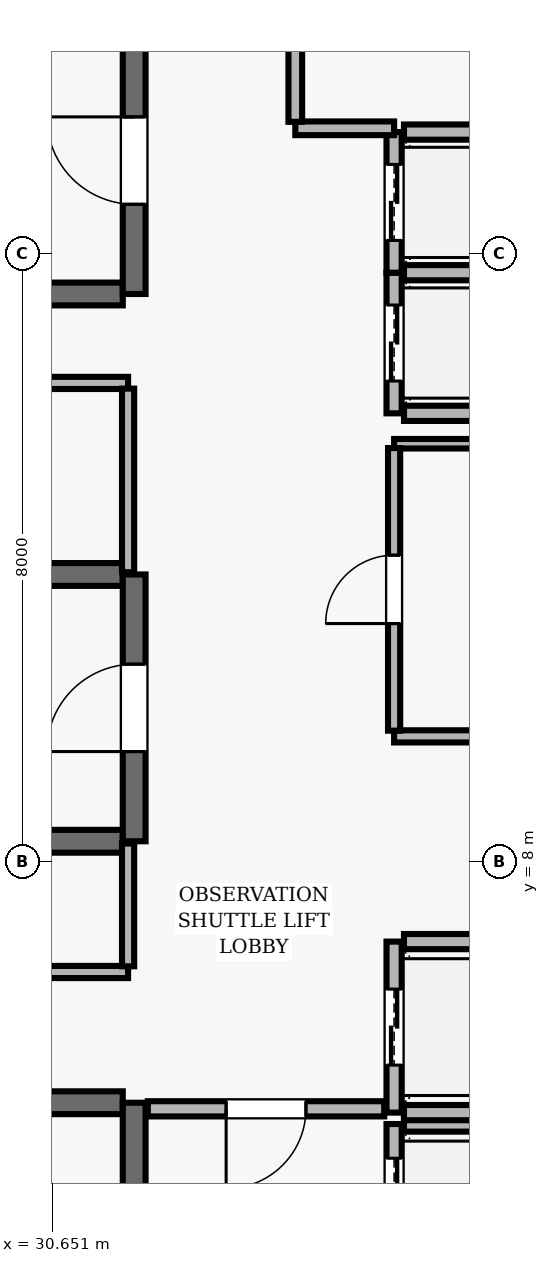
"""IFC4 building model, lengths in metres.
Left out: names, types, materials, properties, quantities, classifications, styles, units other than length and angle.
Written with IfcOpenShell. Run it as: python <this file> out.ifc"""

import sys

from ifc_helpers import new_model, si_unit, direction, frame, frame_2d, origin, place, context, subcontext, project, spatial, rectangle, extrude, element, fill, save


model = new_model("IFC4")
c1 = context("Model", 3, precision=1e-05, world=origin(), true_north=direction((0.0, 1.0)))
c2 = subcontext(c1, "Body", "Model", "MODEL_VIEW")
j1 = project(units=[si_unit("LENGTHUNIT", "METRE"), si_unit("PLANEANGLEUNIT", "RADIAN")], contexts=[c1])
p1 = place(None, origin())
s1 = spatial("IfcSite", under=j1, at=p1, CompositionType="ELEMENT")
p2 = place(p1, origin())
s2 = spatial("IfcBuilding", under=s1, at=p2, CompositionType="ELEMENT")
p3 = place(p2, frame((0.0, 0.0, 311.7)))
s3 = spatial("IfcBuildingStorey", under=s2, at=p3, CompositionType="ELEMENT", Elevation=311.7)
p4 = place(p3, frame((31.58, 4.83, 0.0), z_axis=(0.0, 0.0, 1.0), x_axis=(-1.0, 0.0, 0.0)))
e1 = element("IfcWall", 1, at=p4, inside=s3, PredefinedType="SHEAR", context=c2, shape_type="SweptSolid", body=[
    extrude(rectangle(XDim=8.36, YDim=0.3, at=frame_2d((4.18, 0.0))), origin(), (0.0, 0.0, 1.0), 4.74),
])
p5 = place(p3, frame((31.73, 0.96, 0.0), z_axis=(0.0, 0.0, 1.0), x_axis=(0.0, 1.0, 0.0)))
e2 = element("IfcWall", 2, at=p5, inside=s3, PredefinedType="SHEAR", context=c2, shape_type="SweptSolid", body=[
    extrude(rectangle(XDim=3.87, YDim=0.3, at=frame_2d((1.935, 0.0))), origin(), (0.0, 0.0, 1.0), 4.74),
])
p6 = place(p5, frame((1.54, 0.0, 0.0)))
e3 = element("IfcOpeningElement", 3, at=p6, cuts=e2, PredefinedType="OPENING", context=c2, shape_type="SweptSolid", body=[
    extrude(rectangle(XDim=1.15, YDim=2.15, at=frame_2d((0.575, 1.075))), frame((0.0, 0.16, 0.0), z_axis=(0.0, -1.0, 0.0), x_axis=(1.0, 0.0, 0.0)), (0.0, 0.0, 1.0), 0.32),
])
p7 = place(p3, frame((23.22, 15.47, 0.0), z_axis=(0.0, 0.0, 1.0), x_axis=(1.0, 0.0, 0.0)))
e4 = element("IfcWall", 4, at=p7, inside=s3, PredefinedType="SHEAR", context=c2, shape_type="SweptSolid", body=[
    extrude(rectangle(XDim=8.36, YDim=0.3, at=frame_2d((4.18, 0.0))), origin(), (0.0, 0.0, 1.0), 4.74),
])
p8 = place(p3, frame((31.73, 15.47, 0.0), z_axis=(0.0, 0.0, 1.0), x_axis=(0.0, 1.0, 0.0)))
e5 = element("IfcWall", 5, at=p8, inside=s3, PredefinedType="SHEAR", context=c2, shape_type="SweptSolid", body=[
    extrude(rectangle(XDim=3.51, YDim=0.3, at=frame_2d((1.755, 0.0))), origin(), (0.0, 0.0, 1.0), 4.74),
])
p9 = place(p8, frame((1.18, 0.0, 0.0)))
e6 = element("IfcOpeningElement", 6, at=p9, cuts=e5, PredefinedType="OPENING", context=c2, shape_type="SweptSolid", body=[
    extrude(rectangle(XDim=1.15, YDim=2.15, at=frame_2d((0.575, 1.075))), frame((0.0, 0.16, 0.0), z_axis=(0.0, -1.0, 0.0), x_axis=(1.0, 0.0, 0.0)), (0.0, 0.0, 1.0), 0.32),
])
for number, where, z_axis, x_axis in (
    (7, (31.58, 11.78, 0.0), (0.0, 0.0, 1.0), (-1.0, 0.0, 0.0)),
    (8, (23.22, 8.27, 0.0), (0.0, 0.0, 1.0), (1.0, 0.0, 0.0)),
):
    element("IfcWall", number, at=place(p3, frame(where, z_axis=z_axis, x_axis=x_axis)), inside=s3, PredefinedType="SHEAR", context=c2, shape_type="SweptSolid", body=[
        extrude(rectangle(XDim=8.36, YDim=0.3, at=frame_2d((4.18, 0.0))), origin(), (0.0, 0.0, 1.0), 4.74),
    ])
p10 = place(p3, frame((31.73, 8.27, 0.0), z_axis=(0.0, 0.0, 1.0), x_axis=(0.0, 1.0, 0.0)))
e9 = element("IfcWall", 9, at=p10, inside=s3, PredefinedType="SHEAR", context=c2, shape_type="SweptSolid", body=[
    extrude(rectangle(XDim=3.51, YDim=0.3, at=frame_2d((1.755, 0.0))), origin(), (0.0, 0.0, 1.0), 4.74),
])
p11 = place(p10, frame((1.18, 0.0, 0.0)))
e10 = element("IfcOpeningElement", 10, at=p11, cuts=e9, PredefinedType="OPENING", context=c2, shape_type="SweptSolid", body=[
    extrude(rectangle(XDim=1.15, YDim=2.15, at=frame_2d((0.575, 1.075))), frame((0.0, 0.16, 0.0), z_axis=(0.0, -1.0, 0.0), x_axis=(1.0, 0.0, 0.0)), (0.0, 0.0, 1.0), 0.32),
])
p12 = place(p3, frame((35.15, 4.55, 0.0), z_axis=(0.0, 0.0, 1.0), x_axis=(0.0, -1.0, 0.0)))
e11 = element("IfcWall", 11, at=p12, inside=s3, PredefinedType="SOLIDWALL", context=c2, shape_type="SweptSolid", body=[
    extrude(rectangle(XDim=2.1, YDim=0.2, at=frame_2d((1.05, 0.0))), origin(), (0.0, 0.0, 1.0), 4.74),
])
p13 = place(p12, frame((0.45, 0.0, 0.0)))
e12 = element("IfcOpeningElement", 12, at=p13, cuts=e11, PredefinedType="OPENING", context=c2, shape_type="SweptSolid", body=[
    extrude(rectangle(XDim=1.2, YDim=2.15, at=frame_2d((0.6, 1.075))), frame((0.0, 0.11, 0.0), z_axis=(0.0, -1.0, 0.0), x_axis=(1.0, 0.0, 0.0)), (0.0, 0.0, 1.0), 0.22),
])
p14 = place(p3, frame((37.42, 4.55, 0.0), z_axis=(0.0, 0.0, 1.0), x_axis=(-1.0, 0.0, 0.0)))
e13 = element("IfcWall", 13, at=p14, inside=s3, PredefinedType="SOLIDWALL", context=c2, shape_type="SweptSolid", body=[
    extrude(rectangle(XDim=2.14, YDim=0.2, at=frame_2d((1.07, 0.0))), origin(), (0.0, 0.0, 1.0), 4.74),
])
p15 = place(p3, frame((35.15, 6.95, 0.0), z_axis=(0.0, 0.0, 1.0), x_axis=(0.0, -1.0, 0.0)))
e14 = element("IfcWall", 14, at=p15, inside=s3, PredefinedType="SOLIDWALL", context=c2, shape_type="SweptSolid", body=[
    extrude(rectangle(XDim=2.25, YDim=0.2, at=frame_2d((1.125, 0.0))), origin(), (0.0, 0.0, 1.0), 4.74),
])
p16 = place(p15, frame((0.625, 0.0, 0.0)))
e15 = element("IfcOpeningElement", 15, at=p16, cuts=e14, PredefinedType="OPENING", context=c2, shape_type="SweptSolid", body=[
    extrude(rectangle(XDim=1.0, YDim=2.1, at=frame_2d((0.5, 1.05))), frame((0.0, 0.11, 0.0), z_axis=(0.0, -1.0, 0.0), x_axis=(1.0, 0.0, 0.0)), (0.0, 0.0, 1.0), 0.22),
])
for number, where, z_axis, x_axis in (
    (16, (35.28, 4.7, 0.0), (0.0, 0.0, 1.0), (1.0, 0.0, 0.0)),
    (17, (37.42, 6.95, 0.0), (0.0, 0.0, 1.0), (-1.0, 0.0, 0.0)),
):
    element("IfcWall", number, at=place(p3, frame(where, z_axis=z_axis, x_axis=x_axis)), inside=s3, PredefinedType="SOLIDWALL", context=c2, shape_type="SweptSolid", body=[
        extrude(rectangle(XDim=2.14, YDim=0.2, at=frame_2d((1.07, 0.0))), origin(), (0.0, 0.0, 1.0), 4.74),
    ])
p17 = place(p3, frame((35.15, 15.75, 0.0), z_axis=(0.0, 0.0, 1.0), x_axis=(0.0, -1.0, 0.0)))
e18 = element("IfcWall", 18, at=p17, inside=s3, PredefinedType="SOLIDWALL", context=c2, shape_type="SweptSolid", body=[
    extrude(rectangle(XDim=1.85, YDim=0.2, at=frame_2d((0.925, 0.0))), origin(), (0.0, 0.0, 1.0), 4.74),
])
p18 = place(p17, frame((0.425, 0.0, 0.0)))
e19 = element("IfcOpeningElement", 19, at=p18, cuts=e18, PredefinedType="OPENING", context=c2, shape_type="SweptSolid", body=[
    extrude(rectangle(XDim=1.0, YDim=2.1, at=frame_2d((0.5, 1.05))), frame((0.0, 0.11, 0.0), z_axis=(0.0, -1.0, 0.0), x_axis=(1.0, 0.0, 0.0)), (0.0, 0.0, 1.0), 0.22),
])
for number, where, z_axis, x_axis in (
    (20, (35.28, 13.9, 0.0), (0.0, 0.0, 1.0), (1.0, 0.0, 0.0)),
    (21, (37.42, 15.75, 0.0), (0.0, 0.0, 1.0), (-1.0, 0.0, 0.0)),
):
    element("IfcWall", number, at=place(p3, frame(where, z_axis=z_axis, x_axis=x_axis)), inside=s3, PredefinedType="SOLIDWALL", context=c2, shape_type="SweptSolid", body=[
        extrude(rectangle(XDim=2.14, YDim=0.2, at=frame_2d((1.07, 0.0))), origin(), (0.0, 0.0, 1.0), 4.74),
    ])
p19 = place(p3, frame((35.15, 17.6, 0.0), z_axis=(0.0, 0.0, 1.0), x_axis=(0.0, -1.0, 0.0)))
e22 = element("IfcWall", 22, at=p19, inside=s3, PredefinedType="SOLIDWALL", context=c2, shape_type="SweptSolid", body=[
    extrude(rectangle(XDim=1.85, YDim=0.2, at=frame_2d((0.925, 0.0))), origin(), (0.0, 0.0, 1.0), 4.74),
])
p20 = place(p19, frame((0.425, 0.0, 0.0)))
e23 = element("IfcOpeningElement", 23, at=p20, cuts=e22, PredefinedType="OPENING", context=c2, shape_type="SweptSolid", body=[
    extrude(rectangle(XDim=1.0, YDim=2.1, at=frame_2d((0.5, 1.05))), frame((0.0, 0.11, 0.0), z_axis=(0.0, -1.0, 0.0), x_axis=(1.0, 0.0, 0.0)), (0.0, 0.0, 1.0), 0.22),
])
p21 = place(p3, frame((37.42, 17.6, 0.0), z_axis=(0.0, 0.0, 1.0), x_axis=(-1.0, 0.0, 0.0)))
e24 = element("IfcWall", 24, at=p21, inside=s3, PredefinedType="SOLIDWALL", context=c2, shape_type="SweptSolid", body=[
    extrude(rectangle(XDim=2.14, YDim=0.2, at=frame_2d((1.07, 0.0))), origin(), (0.0, 0.0, 1.0), 4.74),
])
p22 = place(p3, frame((28.8, 14.3, 0.0), z_axis=(0.0, 0.0, 1.0), x_axis=(1.0, 0.0, 0.0)))
e25 = element("IfcWall", 25, at=p22, inside=s3, PredefinedType="PARTITIONING", context=c2, shape_type="SweptSolid", body=[
    extrude(rectangle(XDim=2.85, YDim=0.16, at=frame_2d((1.425, 0.0))), origin(), (0.0, 0.0, 1.0), 4.74),
])
p23 = place(p3, frame((31.65, 6.55, 0.0), z_axis=(0.0, 0.0, 1.0), x_axis=(-1.0, 0.0, 0.0)))
e26 = element("IfcWall", 26, at=p23, inside=s3, PredefinedType="PARTITIONING", context=c2, shape_type="SweptSolid", body=[
    extrude(rectangle(XDim=4.75, YDim=0.16, at=frame_2d((2.375, 0.0))), origin(), (0.0, 0.0, 1.0), 4.74),
])
p24 = place(p23, frame((1.935, 0.0, 0.0)))
e27 = element("IfcOpeningElement", 27, at=p24, cuts=e26, PredefinedType="OPENING", context=c2, shape_type="SweptSolid", body=[
    extrude(rectangle(XDim=0.88, YDim=2.1, at=frame_2d((0.44, 1.05))), frame((0.0, 0.09, 0.0), z_axis=(0.0, -1.0, 0.0), x_axis=(1.0, 0.0, 0.0)), (0.0, 0.0, 1.0), 0.18),
])
p25 = place(p3, frame((33.85, 17.65, 0.0), z_axis=(0.0, 0.0, 1.0), x_axis=(1.0, 0.0, 0.0)))
e28 = element("IfcWall", 28, at=p25, inside=s3, PredefinedType="PARTITIONING", context=c2, shape_type="SweptSolid", body=[
    extrude(rectangle(XDim=1.3, YDim=0.18, at=frame_2d((0.65, 0.0))), origin(), (0.0, 0.0, 1.0), 4.74),
])
p26 = place(p3, frame((35.02, 4.75, 0.0), z_axis=(0.0, 0.0, 1.0), x_axis=(-1.0, 0.0, 0.0)))
e29 = element("IfcWall", 29, at=p26, inside=s3, PredefinedType="SOLIDWALL", context=c2, shape_type="SweptSolid", body=[
    extrude(rectangle(XDim=3.11, YDim=0.2, at=frame_2d((1.555, 0.0))), origin(), (0.0, 0.0, 1.0), 4.74),
])
p27 = place(p26, frame((1.03, 0.0, 0.0)))
e30 = element("IfcOpeningElement", 30, at=p27, cuts=e29, PredefinedType="OPENING", context=c2, shape_type="SweptSolid", body=[
    extrude(rectangle(XDim=1.05, YDim=2.15, at=frame_2d((0.525, 1.075))), frame((0.0, 0.11, 0.0), z_axis=(0.0, -1.0, 0.0), x_axis=(1.0, 0.0, 0.0)), (0.0, 0.0, 1.0), 0.22),
])
p28 = place(p3, frame((35.15, 9.65, 0.0), z_axis=(0.0, 0.0, 1.0), x_axis=(1.0, 0.0, 0.0)))
e31 = element("IfcWall", 31, at=p28, inside=s3, PredefinedType="PARTITIONING", context=c2, shape_type="SweptSolid", body=[
    extrude(rectangle(XDim=2.7, YDim=0.16, at=frame_2d((1.35, 0.0))), origin(), (0.0, 0.0, 1.0), 4.74),
])
p29 = place(p3, frame((37.85, 13.5, 0.0), z_axis=(0.0, 0.0, 1.0), x_axis=(-1.0, 0.0, 0.0)))
e32 = element("IfcWall", 32, at=p29, inside=s3, PredefinedType="PARTITIONING", context=c2, shape_type="SweptSolid", body=[
    extrude(rectangle(XDim=2.7, YDim=0.125, at=frame_2d((1.35, 0.0))), origin(), (0.0, 0.0, 1.0), 4.74),
])
p30 = place(p3, frame((31.65, 8.24, 0.0), z_axis=(0.0, 0.0, 1.0), x_axis=(0.0, -1.0, 0.0)))
e33 = element("IfcWall", 33, at=p30, inside=s3, PredefinedType="PARTITIONING", context=c2, shape_type="SweptSolid", body=[
    extrude(rectangle(XDim=1.615, YDim=0.16, at=frame_2d((0.808, 0.0))), origin(), (0.0, 0.0, 1.0), 4.74),
])
p31 = place(p3, frame((31.65, 14.225, 0.0), z_axis=(0.0, 0.0, 1.0), x_axis=(0.0, -1.0, 0.0)))
e34 = element("IfcWall", 34, at=p31, inside=s3, PredefinedType="PARTITIONING", context=c2, shape_type="SweptSolid", body=[
    extrude(rectangle(XDim=2.415, YDim=0.16, at=frame_2d((1.208, 0.0))), origin(), (0.0, 0.0, 1.0), 4.74),
])
p32 = place(p3, frame((33.85, 17.735, 0.0), z_axis=(0.0, 0.0, 1.0), x_axis=(0.0, 1.0, 0.0)))
e35 = element("IfcWall", 35, at=p32, inside=s3, PredefinedType="PARTITIONING", context=c2, shape_type="SweptSolid", body=[
    extrude(rectangle(XDim=6.03, YDim=0.18, at=frame_2d((3.015, 0.0))), origin(), (0.0, 0.0, 1.0), 4.74),
])
p33 = place(p32, frame((2.54, 0.0, 0.0)))
e36 = element("IfcOpeningElement", 36, at=p33, cuts=e35, PredefinedType="OPENING", context=c2, shape_type="SweptSolid", body=[
    extrude(rectangle(XDim=0.95, YDim=2.1, at=frame_2d((0.475, 1.05))), frame((0.0, 0.1, 0.0), z_axis=(0.0, -1.0, 0.0), x_axis=(1.0, 0.0, 0.0)), (0.0, 0.0, 1.0), 0.2),
])
p34 = place(p3, frame((35.15, 9.725, 0.0), z_axis=(0.0, 0.0, 1.0), x_axis=(0.0, 1.0, 0.0)))
e37 = element("IfcWall", 37, at=p34, inside=s3, PredefinedType="PARTITIONING", context=c2, shape_type="SweptSolid", body=[
    extrude(rectangle(XDim=3.718, YDim=0.16, at=frame_2d((1.859, 0.0))), origin(), (0.0, 0.0, 1.0), 4.74),
])
p35 = place(p34, frame((1.409, 0.0, 0.0)))
e38 = element("IfcOpeningElement", 38, at=p35, cuts=e37, PredefinedType="OPENING", context=c2, shape_type="SweptSolid", body=[
    extrude(rectangle(XDim=0.9, YDim=2.1, at=frame_2d((0.45, 1.05))), frame((0.0, 0.09, 0.0), z_axis=(0.0, -1.0, 0.0), x_axis=(1.0, 0.0, 0.0)), (0.0, 0.0, 1.0), 0.18),
])
p36 = place(p9, origin())
e39 = element("IfcDoor", 39, at=p36, inside=s3, OperationType="SINGLE_SWING_RIGHT", PredefinedType="DOOR", context=c2, shape_type="SweptSolid", body=[
    extrude(rectangle(XDim=1.15, YDim=2.15, at=frame_2d((0.575, 1.075))), frame((0.0, 0.025, 0.0), z_axis=(0.0, -1.0, 0.0), x_axis=(1.0, 0.0, 0.0)), (0.0, 0.0, 1.0), 0.05),
])
fill(e6, e39)
p37 = place(p11, origin())
e40 = element("IfcDoor", 40, at=p37, inside=s3, OperationType="SINGLE_SWING_LEFT", PredefinedType="DOOR", context=c2, shape_type="SweptSolid", body=[
    extrude(rectangle(XDim=1.15, YDim=2.15, at=frame_2d((0.575, 1.075))), frame((0.0, 0.025, 0.0), z_axis=(0.0, -1.0, 0.0), x_axis=(1.0, 0.0, 0.0)), (0.0, 0.0, 1.0), 0.05),
])
fill(e10, e40)
p38 = place(p13, origin())
e41 = element("IfcDoor", 41, at=p38, inside=s3, OperationType="DOUBLE_DOOR_SLIDING", PredefinedType="DOOR", context=c2, shape_type="SweptSolid", body=[
    extrude(rectangle(XDim=1.2, YDim=2.15, at=frame_2d((0.6, 1.075))), frame((0.0, 0.025, 0.0), z_axis=(0.0, -1.0, 0.0), x_axis=(1.0, 0.0, 0.0)), (0.0, 0.0, 1.0), 0.05),
])
fill(e12, e41)
p39 = place(p16, origin())
e42 = element("IfcDoor", 42, at=p39, inside=s3, OperationType="DOUBLE_DOOR_SLIDING", PredefinedType="DOOR", context=c2, shape_type="SweptSolid", body=[
    extrude(rectangle(XDim=1.0, YDim=2.1, at=frame_2d((0.5, 1.05))), frame((0.0, 0.025, 0.0), z_axis=(0.0, -1.0, 0.0), x_axis=(1.0, 0.0, 0.0)), (0.0, 0.0, 1.0), 0.05),
])
fill(e15, e42)
p40 = place(p18, origin())
e43 = element("IfcDoor", 43, at=p40, inside=s3, OperationType="DOUBLE_DOOR_SLIDING", PredefinedType="DOOR", context=c2, shape_type="SweptSolid", body=[
    extrude(rectangle(XDim=1.0, YDim=2.1, at=frame_2d((0.5, 1.05))), frame((0.0, 0.025, 0.0), z_axis=(0.0, -1.0, 0.0), x_axis=(1.0, 0.0, 0.0)), (0.0, 0.0, 1.0), 0.05),
])
fill(e19, e43)
p41 = place(p20, origin())
e44 = element("IfcDoor", 44, at=p41, inside=s3, OperationType="DOUBLE_DOOR_SLIDING", PredefinedType="DOOR", context=c2, shape_type="SweptSolid", body=[
    extrude(rectangle(XDim=1.0, YDim=2.1, at=frame_2d((0.5, 1.05))), frame((0.0, 0.025, 0.0), z_axis=(0.0, -1.0, 0.0), x_axis=(1.0, 0.0, 0.0)), (0.0, 0.0, 1.0), 0.05),
])
fill(e23, e44)
p42 = place(p27, origin())
e45 = element("IfcDoor", 45, at=p42, inside=s3, OperationType="SINGLE_SWING_RIGHT", PredefinedType="DOOR", context=c2, shape_type="SweptSolid", body=[
    extrude(rectangle(XDim=1.05, YDim=2.15, at=frame_2d((0.525, 1.075))), frame((0.0, 0.025, 0.0), z_axis=(0.0, -1.0, 0.0), x_axis=(1.0, 0.0, 0.0)), (0.0, 0.0, 1.0), 0.05),
])
fill(e30, e45)
p43 = place(p35, origin())
e46 = element("IfcDoor", 46, at=p43, inside=s3, OperationType="SINGLE_SWING_LEFT", PredefinedType="DOOR", context=c2, shape_type="SweptSolid", body=[
    extrude(rectangle(XDim=0.9, YDim=2.1, at=frame_2d((0.45, 1.05))), frame((0.0, 0.025, 0.0), z_axis=(0.0, -1.0, 0.0), x_axis=(1.0, 0.0, 0.0)), (0.0, 0.0, 1.0), 0.05),
])
fill(e38, e46)
save(model, sys.argv[1])
